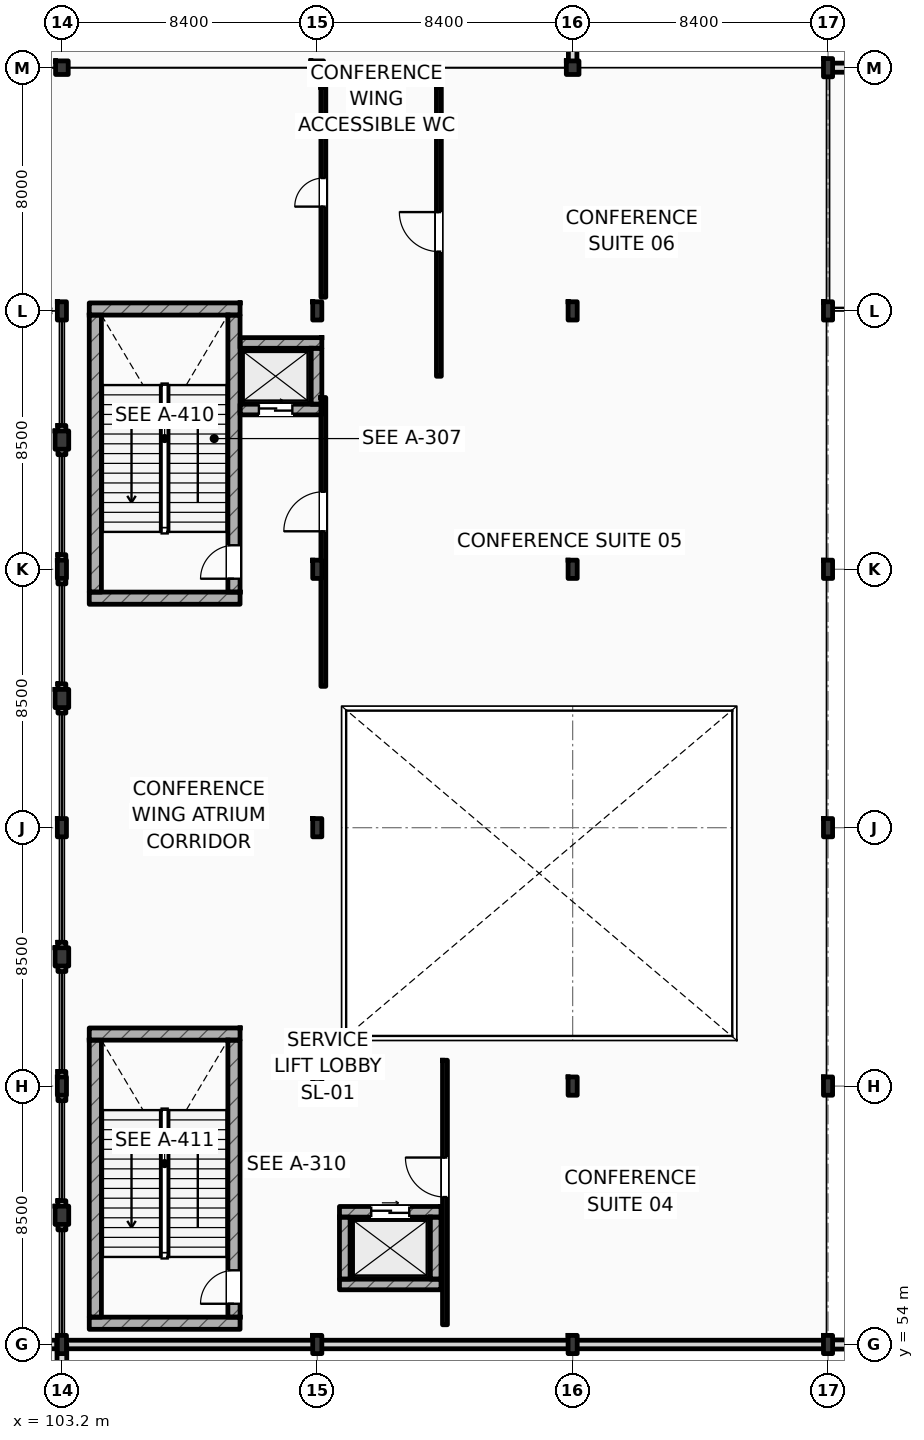
"""IFC4 building model, lengths in metres.
Left out: names, types, materials, properties, quantities, classifications, styles, units other than length and angle.
Written with IfcOpenShell. Run it as: python <this file> out.ifc"""

import sys

from ifc_helpers import new_model, si_unit, direction, frame, frame_2d, origin, origin_2d, place, context, subcontext, project, spatial, rectangle, i_section, extrude, element, fill, save


model = new_model("IFC4")
c1 = context("Model", 3, precision=1e-05, world=origin(), true_north=direction((0.0, 1.0)))
c2 = subcontext(c1, "Body", "Model", "MODEL_VIEW")
j1 = project(units=[si_unit("LENGTHUNIT", "METRE"), si_unit("PLANEANGLEUNIT", "RADIAN")], contexts=[c1])
p1 = place(None, origin())
s1 = spatial("IfcSite", under=j1, at=p1, CompositionType="ELEMENT")
p2 = place(p1, origin())
s2 = spatial("IfcBuilding", under=s1, at=p2, CompositionType="ELEMENT")
p3 = place(p2, frame((0.0, 0.0, 6.0)))
s3 = spatial("IfcBuildingStorey", under=s2, at=p3, CompositionType="ELEMENT", Elevation=6.0)
for number, where, z_axis, x_axis in (
    (1, (103.2, 96.0, 0.0), (0.0, 0.0, 1.0), (1.0, 0.0, 0.0)),
    (2, (111.6, 96.0, 0.0), (0.0, 0.0, 1.0), (1.0, 0.0, 0.0)),
    (3, (120.0, 96.0, 0.0), (0.0, 0.0, 1.0), (1.0, 0.0, 0.0)),
):
    element("IfcColumn", number, at=place(p3, frame(where, z_axis=z_axis, x_axis=x_axis)), inside=s3, PredefinedType="COLUMN", context=c2, shape_type="SweptSolid", body=[
        extrude(i_section(OverallWidth=0.416, OverallDepth=0.446, WebThickness=0.036, FlangeThickness=0.048, FilletRadius=0.015, at=origin_2d()), origin(), (0.0, 0.0, 1.0), 5.4),
    ])
for number, where, z_axis, x_axis in (
    (4, (103.2, 88.0, 0.0), (0.0, 0.0, 1.0), (1.0, 0.0, 0.0)),
    (5, (103.2, 54.0, 0.0), (0.0, 0.0, 1.0), (1.0, 0.0, 0.0)),
    (6, (103.2, 62.5, 0.0), (0.0, 0.0, 1.0), (1.0, 0.0, 0.0)),
    (7, (103.2, 71.0, 0.0), (0.0, 0.0, 1.0), (1.0, 0.0, 0.0)),
    (8, (103.2, 79.5, 0.0), (0.0, 0.0, 1.0), (1.0, 0.0, 0.0)),
    (9, (111.6, 54.0, 0.0), (0.0, 0.0, 1.0), (1.0, 0.0, 0.0)),
    (10, (111.6, 62.5, 0.0), (0.0, 0.0, 1.0), (1.0, 0.0, 0.0)),
    (11, (111.6, 71.0, 0.0), (0.0, 0.0, 1.0), (1.0, 0.0, 0.0)),
    (12, (111.6, 79.5, 0.0), (0.0, 0.0, 1.0), (1.0, 0.0, 0.0)),
    (13, (111.6, 88.0, 0.0), (0.0, 0.0, 1.0), (1.0, 0.0, 0.0)),
    (14, (120.0, 54.0, 0.0), (0.0, 0.0, 1.0), (1.0, 0.0, 0.0)),
    (15, (120.0, 62.5, 0.0), (0.0, 0.0, 1.0), (1.0, 0.0, 0.0)),
    (16, (120.0, 79.5, 0.0), (0.0, 0.0, 1.0), (1.0, 0.0, 0.0)),
    (17, (120.0, 88.0, 0.0), (0.0, 0.0, 1.0), (1.0, 0.0, 0.0)),
    (18, (128.4, 54.0, 0.0), (0.0, 0.0, 1.0), (1.0, 0.0, 0.0)),
    (19, (128.4, 62.5, 0.0), (0.0, 0.0, 1.0), (1.0, 0.0, 0.0)),
    (20, (128.4, 71.0, 0.0), (0.0, 0.0, 1.0), (1.0, 0.0, 0.0)),
    (21, (128.4, 79.5, 0.0), (0.0, 0.0, 1.0), (1.0, 0.0, 0.0)),
    (22, (128.4, 88.0, 0.0), (0.0, 0.0, 1.0), (1.0, 0.0, 0.0)),
    (23, (128.4, 96.0, 0.0), (0.0, 0.0, 1.0), (1.0, 0.0, 0.0)),
):
    element("IfcColumn", number, at=place(p3, frame(where, z_axis=z_axis, x_axis=x_axis)), inside=s3, PredefinedType="COLUMN", context=c2, shape_type="SweptSolid", body=[
        extrude(i_section(OverallWidth=0.3, OverallDepth=0.6, WebThickness=0.015, FlangeThickness=0.03, FilletRadius=0.027, at=origin_2d()), origin(), (0.0, 0.0, 1.0), 5.4),
    ])
for number, where, z_axis, x_axis in (
    (24, (103.2, 58.25, 0.0), (0.0, 0.0, 1.0), (1.0, 0.0, 0.0)),
    (25, (103.2, 66.75, 0.0), (0.0, 0.0, 1.0), (1.0, 0.0, 0.0)),
    (26, (103.2, 75.25, 0.0), (0.0, 0.0, 1.0), (1.0, 0.0, 0.0)),
    (27, (103.2, 83.75, 0.0), (0.0, 0.0, 1.0), (1.0, 0.0, 0.0)),
):
    element("IfcColumn", number, at=place(p3, frame(where, z_axis=z_axis, x_axis=x_axis)), inside=s3, PredefinedType="PILASTER", context=c2, shape_type="SweptSolid", body=[
        extrude(rectangle(XDim=0.45, YDim=0.6, at=origin_2d()), origin(), (0.0, 0.0, 1.0), 5.4),
    ])
for number, where, z_axis, x_axis in (
    (28, (104.1, 88.062, 0.0), (0.0, 0.0, 1.0), (1.0, 0.0, 0.0)),
    (29, (104.1, 78.55, 0.0), (0.0, 0.0, 1.0), (1.0, 0.0, 0.0)),
):
    element("IfcWall", number, at=place(p3, frame(where, z_axis=z_axis, x_axis=x_axis)), inside=s3, PredefinedType="SHEAR", context=c2, shape_type="SweptSolid", body=[
        extrude(rectangle(XDim=4.96, YDim=0.4, at=frame_2d((2.48, 0.0))), origin(), (0.0, 0.0, 1.0), 5.4),
    ])
p4 = place(p3, frame((104.3, 78.75, 0.0), z_axis=(0.0, 0.0, 1.0), x_axis=(0.0, 1.0, 0.0)))
e30 = element("IfcWall", 30, at=p4, inside=s3, PredefinedType="SHEAR", context=c2, shape_type="SweptSolid", body=[
    extrude(rectangle(XDim=9.112, YDim=0.4, at=frame_2d((4.556, 0.0))), origin(), (0.0, 0.0, 1.0), 5.4),
])
p5 = place(p3, frame((108.86, 78.75, 0.0), z_axis=(0.0, 0.0, 1.0), x_axis=(0.0, 1.0, 0.0)))
e31 = element("IfcWall", 31, at=p5, inside=s3, PredefinedType="SHEAR", context=c2, shape_type="SweptSolid", body=[
    extrude(rectangle(XDim=9.112, YDim=0.4, at=frame_2d((4.556, 0.0))), origin(), (0.0, 0.0, 1.0), 5.4),
])
p6 = place(p5, frame((0.44, 0.0, 0.0)))
e32 = element("IfcOpeningElement", 32, at=p6, cuts=e31, PredefinedType="OPENING", context=c2, shape_type="SweptSolid", body=[
    extrude(rectangle(XDim=1.1, YDim=2.2, at=frame_2d((0.55, 1.1))), frame((0.0, 0.21, 0.0), z_axis=(0.0, -1.0, 0.0), x_axis=(1.0, 0.0, 0.0)), (0.0, 0.0, 1.0), 0.42),
])
for number, where, z_axis, x_axis in (
    (33, (104.1, 64.212, 0.0), (0.0, 0.0, 1.0), (1.0, 0.0, 0.0)),
    (34, (104.1, 54.7, 0.0), (0.0, 0.0, 1.0), (1.0, 0.0, 0.0)),
):
    element("IfcWall", number, at=place(p3, frame(where, z_axis=z_axis, x_axis=x_axis)), inside=s3, PredefinedType="SHEAR", context=c2, shape_type="SweptSolid", body=[
        extrude(rectangle(XDim=4.96, YDim=0.4, at=frame_2d((2.48, 0.0))), origin(), (0.0, 0.0, 1.0), 5.4),
    ])
p7 = place(p3, frame((104.3, 54.9, 0.0), z_axis=(0.0, 0.0, 1.0), x_axis=(0.0, 1.0, 0.0)))
e35 = element("IfcWall", 35, at=p7, inside=s3, PredefinedType="SHEAR", context=c2, shape_type="SweptSolid", body=[
    extrude(rectangle(XDim=9.112, YDim=0.4, at=frame_2d((4.556, 0.0))), origin(), (0.0, 0.0, 1.0), 5.4),
])
p8 = place(p3, frame((108.86, 54.9, 0.0), z_axis=(0.0, 0.0, 1.0), x_axis=(0.0, 1.0, 0.0)))
e36 = element("IfcWall", 36, at=p8, inside=s3, PredefinedType="SHEAR", context=c2, shape_type="SweptSolid", body=[
    extrude(rectangle(XDim=9.112, YDim=0.4, at=frame_2d((4.556, 0.0))), origin(), (0.0, 0.0, 1.0), 5.4),
])
p9 = place(p8, frame((0.44, 0.0, 0.0)))
e37 = element("IfcOpeningElement", 37, at=p9, cuts=e36, PredefinedType="OPENING", context=c2, shape_type="SweptSolid", body=[
    extrude(rectangle(XDim=1.1, YDim=2.2, at=frame_2d((0.55, 1.1))), frame((0.0, 0.21, 0.0), z_axis=(0.0, -1.0, 0.0), x_axis=(1.0, 0.0, 0.0)), (0.0, 0.0, 1.0), 0.42),
])
p10 = place(p3, frame((103.2, 9.0, 0.0), z_axis=(0.0, 0.0, 1.0), x_axis=(0.0, 1.0, 0.0)))
e38 = element("IfcWall", 38, at=p10, inside=s3, PredefinedType="STANDARD", context=c2, shape_type="SweptSolid", body=[
    extrude(rectangle(XDim=45.0, YDim=0.32, at=frame_2d((22.5, 0.0))), origin(), (0.0, 0.0, 1.0), 4.55),
])
p11 = place(p3, frame((79.8, 54.0, 0.0), z_axis=(0.0, 0.0, 1.0), x_axis=(1.0, 0.0, 0.0)))
e39 = element("IfcWall", 39, at=p11, inside=s3, PredefinedType="STANDARD", context=c2, shape_type="SweptSolid", body=[
    extrude(rectangle(XDim=23.4, YDim=0.28, at=frame_2d((11.7, 0.0))), origin(), (0.0, 0.0, 1.0), 4.54),
])
p12 = place(p11, frame((10.65, 0.0, 1.05)))
e40 = element("IfcOpeningElement", 40, at=p12, cuts=e39, PredefinedType="OPENING", context=c2, shape_type="SweptSolid", body=[
    extrude(rectangle(XDim=2.1, YDim=2.2, at=frame_2d((1.05, 1.1))), frame((0.0, 0.15, 0.0), z_axis=(0.0, -1.0, 0.0), x_axis=(1.0, 0.0, 0.0)), (0.0, 0.0, 1.0), 0.3),
])
p13 = place(p3, frame((103.2, 54.0, 0.0), z_axis=(0.0, 0.0, 1.0), x_axis=(1.0, 0.0, 0.0)))
e41 = element("IfcWall", 41, at=p13, inside=s3, PredefinedType="STANDARD", context=c2, shape_type="SweptSolid", body=[
    extrude(rectangle(XDim=25.2, YDim=0.28, at=frame_2d((12.6, 0.0))), origin(), (0.0, 0.0, 1.0), 4.49),
])
for number, where, z_axis, x_axis in (
    (42, (103.2, 57.77, 0.0), (0.0, 0.0, 1.0), (0.0, 1.0, 0.0)),
    (43, (103.2, 62.02, 0.0), (0.0, 0.0, 1.0), (0.0, 1.0, 0.0)),
    (44, (103.2, 66.27, 0.0), (0.0, 0.0, 1.0), (0.0, 1.0, 0.0)),
    (45, (103.2, 74.77, 0.0), (0.0, 0.0, 1.0), (0.0, 1.0, 0.0)),
    (46, (103.2, 79.02, 0.0), (0.0, 0.0, 1.0), (0.0, 1.0, 0.0)),
    (47, (103.2, 83.27, 0.0), (0.0, 0.0, 1.0), (0.0, 1.0, 0.0)),
):
    element("IfcWall", number, at=place(p3, frame(where, z_axis=z_axis, x_axis=x_axis)), inside=s3, PredefinedType="STANDARD", context=c2, shape_type="SweptSolid", body=[
        extrude(rectangle(XDim=0.96, YDim=0.26, at=frame_2d((0.48, 0.0))), origin(), (0.0, 0.0, 1.0), 4.55),
    ])
p14 = place(p3, frame((128.4, 54.0, 0.0), z_axis=(0.0, 0.0, 1.0), x_axis=(1.0, 0.0, 0.0)))
e48 = element("IfcWall", 48, at=p14, inside=s3, PredefinedType="STANDARD", context=c2, shape_type="SweptSolid", body=[
    extrude(rectangle(XDim=9.0, YDim=0.3, at=frame_2d((4.5, 0.0))), origin(), (0.0, 0.0, 1.0), 4.44),
])
p15 = place(p3, frame((128.4, 96.0, 0.0), z_axis=(0.0, 0.0, 1.0), x_axis=(1.0, 0.0, 0.0)))
e49 = element("IfcWall", 49, at=p15, inside=s3, PredefinedType="STANDARD", context=c2, shape_type="SweptSolid", body=[
    extrude(rectangle(XDim=9.0, YDim=0.3, at=frame_2d((4.5, 0.0))), origin(), (0.0, 0.0, 1.0), 4.57),
])
p16 = place(p3, frame((120.0, 96.0, 0.0), z_axis=(0.0, 0.0, 1.0), x_axis=(0.0, 1.0, 0.0)))
e50 = element("IfcWall", 50, at=p16, inside=s3, PredefinedType="STANDARD", context=c2, shape_type="SweptSolid", body=[
    extrude(rectangle(XDim=22.0, YDim=0.28, at=frame_2d((11.0, 0.0))), origin(), (0.0, 0.0, 1.0), 4.59),
])
p17 = place(p3, frame((109.06, 86.945, 0.0), z_axis=(0.0, 0.0, 1.0), x_axis=(1.0, 0.0, 0.0)))
e51 = element("IfcWall", 51, at=p17, inside=s3, PredefinedType="SHEAR", context=c2, shape_type="SweptSolid", body=[
    extrude(rectangle(XDim=2.69, YDim=0.35, at=frame_2d((1.345, 0.0))), origin(), (0.0, 0.0, 1.0), 5.05),
])
p18 = place(p3, frame((109.06, 84.755, 0.0), z_axis=(0.0, 0.0, 1.0), x_axis=(1.0, 0.0, 0.0)))
e52 = element("IfcWall", 52, at=p18, inside=s3, PredefinedType="SHEAR", context=c2, shape_type="SweptSolid", body=[
    extrude(rectangle(XDim=2.69, YDim=0.35, at=frame_2d((1.345, 0.0))), origin(), (0.0, 0.0, 1.0), 5.05),
])
p19 = place(p18, frame((0.62, 0.0, 0.0)))
e53 = element("IfcOpeningElement", 53, at=p19, cuts=e52, PredefinedType="OPENING", context=c2, shape_type="SweptSolid", body=[
    extrude(rectangle(XDim=1.1, YDim=2.2, at=frame_2d((0.55, 1.1))), frame((0.0, 0.185, 0.0), z_axis=(0.0, -1.0, 0.0), x_axis=(1.0, 0.0, 0.0)), (0.0, 0.0, 1.0), 0.37),
])
p20 = place(p3, frame((111.575, 84.93, 0.0), z_axis=(0.0, 0.0, 1.0), x_axis=(0.0, 1.0, 0.0)))
e54 = element("IfcWall", 54, at=p20, inside=s3, PredefinedType="SHEAR", context=c2, shape_type="SweptSolid", body=[
    extrude(rectangle(XDim=1.84, YDim=0.35, at=frame_2d((0.92, 0.0))), origin(), (0.0, 0.0, 1.0), 4.55),
])
p21 = place(p3, frame((112.33, 58.365, 0.0), z_axis=(0.0, 0.0, 1.0), x_axis=(1.0, 0.0, 0.0)))
e55 = element("IfcWall", 55, at=p21, inside=s3, PredefinedType="SHEAR", context=c2, shape_type="SweptSolid", body=[
    extrude(rectangle(XDim=3.34, YDim=0.35, at=frame_2d((1.67, 0.0))), origin(), (0.0, 0.0, 1.0), 5.05),
])
p22 = place(p21, frame((1.045, 0.0, 0.0)))
e56 = element("IfcOpeningElement", 56, at=p22, cuts=e55, PredefinedType="OPENING", context=c2, shape_type="SweptSolid", body=[
    extrude(rectangle(XDim=1.25, YDim=2.25, at=frame_2d((0.625, 1.125))), frame((0.0, 0.185, 0.0), z_axis=(0.0, -1.0, 0.0), x_axis=(1.0, 0.0, 0.0)), (0.0, 0.0, 1.0), 0.37),
])
p23 = place(p3, frame((112.33, 55.975, 0.0), z_axis=(0.0, 0.0, 1.0), x_axis=(1.0, 0.0, 0.0)))
e57 = element("IfcWall", 57, at=p23, inside=s3, PredefinedType="SHEAR", context=c2, shape_type="SweptSolid", body=[
    extrude(rectangle(XDim=3.34, YDim=0.35, at=frame_2d((1.67, 0.0))), origin(), (0.0, 0.0, 1.0), 5.05),
])
for number, where, z_axis, x_axis in (
    (58, (112.505, 56.15, 0.0), (0.0, 0.0, 1.0), (0.0, 1.0, 0.0)),
    (59, (115.495, 56.15, 0.0), (0.0, 0.0, 1.0), (0.0, 1.0, 0.0)),
):
    element("IfcWall", number, at=place(p3, frame(where, z_axis=z_axis, x_axis=x_axis)), inside=s3, PredefinedType="SHEAR", context=c2, shape_type="SweptSolid", body=[
        extrude(rectangle(XDim=2.04, YDim=0.35, at=frame_2d((1.02, 0.0))), origin(), (0.0, 0.0, 1.0), 5.05),
    ])
p24 = place(p3, frame((115.8, 54.65, 0.0), z_axis=(0.0, 0.0, 1.0), x_axis=(0.0, 1.0, 0.0)))
e60 = element("IfcWall", 60, at=p24, inside=s3, PredefinedType="PARTITIONING", context=c2, shape_type="SweptSolid", body=[
    extrude(rectangle(XDim=8.7, YDim=0.16, at=frame_2d((4.35, 0.0))), origin(), (0.0, 0.0, 1.0), 5.05),
])
p25 = place(p24, frame((4.2, 0.0, 0.0)))
e61 = element("IfcOpeningElement", 61, at=p25, cuts=e60, PredefinedType="OPENING", context=c2, shape_type="SweptSolid", body=[
    extrude(rectangle(XDim=1.3, YDim=2.2, at=frame_2d((0.65, 1.1))), frame((0.0, 0.09, 0.0), z_axis=(0.0, -1.0, 0.0), x_axis=(1.0, 0.0, 0.0)), (0.0, 0.0, 1.0), 0.18),
])
p26 = place(p3, frame((111.8, 75.65, 0.0), z_axis=(0.0, 0.0, 1.0), x_axis=(0.0, 1.0, 0.0)))
e62 = element("IfcWall", 62, at=p26, inside=s3, PredefinedType="PARTITIONING", context=c2, shape_type="SweptSolid", body=[
    extrude(rectangle(XDim=9.5, YDim=0.16, at=frame_2d((4.75, 0.0))), origin(), (0.0, 0.0, 1.0), 4.55),
])
p27 = place(p26, frame((5.1, 0.0, 0.0)))
e63 = element("IfcOpeningElement", 63, at=p27, cuts=e62, PredefinedType="OPENING", context=c2, shape_type="SweptSolid", body=[
    extrude(rectangle(XDim=1.3, YDim=2.2, at=frame_2d((0.65, 1.1))), frame((0.0, 0.09, 0.0), z_axis=(0.0, -1.0, 0.0), x_axis=(1.0, 0.0, 0.0)), (0.0, 0.0, 1.0), 0.18),
])
p28 = place(p3, frame((115.6, 85.85, 0.0), z_axis=(0.0, 0.0, 1.0), x_axis=(0.0, 1.0, 0.0)))
e64 = element("IfcWall", 64, at=p28, inside=s3, PredefinedType="PARTITIONING", context=c2, shape_type="SweptSolid", body=[
    extrude(rectangle(XDim=9.5, YDim=0.16, at=frame_2d((4.75, 0.0))), origin(), (0.0, 0.0, 1.0), 5.05),
])
p29 = place(p28, frame((4.1, 0.0, 0.0)))
e65 = element("IfcOpeningElement", 65, at=p29, cuts=e64, PredefinedType="OPENING", context=c2, shape_type="SweptSolid", body=[
    extrude(rectangle(XDim=1.3, YDim=2.2, at=frame_2d((0.65, 1.1))), frame((0.0, 0.09, 0.0), z_axis=(0.0, -1.0, 0.0), x_axis=(1.0, 0.0, 0.0)), (0.0, 0.0, 1.0), 0.18),
])
p30 = place(p3, frame((111.8, 88.45, 0.0), z_axis=(0.0, 0.0, 1.0), x_axis=(0.0, 1.0, 0.0)))
e66 = element("IfcWall", 66, at=p30, inside=s3, PredefinedType="PARTITIONING", context=c2, shape_type="SweptSolid", body=[
    extrude(rectangle(XDim=6.9, YDim=0.16, at=frame_2d((3.45, 0.0))), origin(), (0.0, 0.0, 1.0), 4.59),
])
p31 = place(p30, frame((2.98, 0.0, 0.0)))
e67 = element("IfcOpeningElement", 67, at=p31, cuts=e66, PredefinedType="OPENING", context=c2, shape_type="SweptSolid", body=[
    extrude(rectangle(XDim=0.94, YDim=2.15, at=frame_2d((0.47, 1.075))), frame((0.0, 0.09, 0.0), z_axis=(0.0, -1.0, 0.0), x_axis=(1.0, 0.0, 0.0)), (0.0, 0.0, 1.0), 0.18),
])
p32 = place(p6, origin())
e68 = element("IfcDoor", 68, at=p32, inside=s3, OperationType="SINGLE_SWING_LEFT", PredefinedType="DOOR", context=c2, shape_type="SweptSolid", body=[
    extrude(rectangle(XDim=1.1, YDim=2.2, at=frame_2d((0.55, 1.1))), frame((0.0, 0.025, 0.0), z_axis=(0.0, -1.0, 0.0), x_axis=(1.0, 0.0, 0.0)), (0.0, 0.0, 1.0), 0.05),
])
fill(e32, e68)
p33 = place(p9, origin())
e69 = element("IfcDoor", 69, at=p33, inside=s3, OperationType="SINGLE_SWING_LEFT", PredefinedType="DOOR", context=c2, shape_type="SweptSolid", body=[
    extrude(rectangle(XDim=1.1, YDim=2.2, at=frame_2d((0.55, 1.1))), frame((0.0, 0.025, 0.0), z_axis=(0.0, -1.0, 0.0), x_axis=(1.0, 0.0, 0.0)), (0.0, 0.0, 1.0), 0.05),
])
fill(e37, e69)
p34 = place(p19, origin())
e70 = element("IfcDoor", 70, at=p34, inside=s3, OperationType="SLIDING_TO_LEFT", PredefinedType="DOOR", context=c2, shape_type="SweptSolid", body=[
    extrude(rectangle(XDim=1.1, YDim=2.2, at=frame_2d((0.55, 1.1))), frame((0.0, 0.025, 0.0), z_axis=(0.0, -1.0, 0.0), x_axis=(1.0, 0.0, 0.0)), (0.0, 0.0, 1.0), 0.05),
])
fill(e53, e70)
p35 = place(p22, origin())
e71 = element("IfcDoor", 71, at=p35, inside=s3, OperationType="SLIDING_TO_LEFT", PredefinedType="DOOR", context=c2, shape_type="SweptSolid", body=[
    extrude(rectangle(XDim=1.25, YDim=2.25, at=frame_2d((0.625, 1.125))), frame((0.0, 0.025, 0.0), z_axis=(0.0, -1.0, 0.0), x_axis=(1.0, 0.0, 0.0)), (0.0, 0.0, 1.0), 0.05),
])
fill(e56, e71)
p36 = place(p25, origin())
e72 = element("IfcDoor", 72, at=p36, inside=s3, OperationType="SINGLE_SWING_RIGHT", PredefinedType="DOOR", context=c2, shape_type="SweptSolid", body=[
    extrude(rectangle(XDim=1.3, YDim=2.2, at=frame_2d((0.65, 1.1))), frame((0.0, 0.025, 0.0), z_axis=(0.0, -1.0, 0.0), x_axis=(1.0, 0.0, 0.0)), (0.0, 0.0, 1.0), 0.05),
])
fill(e61, e72)
p37 = place(p27, origin())
e73 = element("IfcDoor", 73, at=p37, inside=s3, OperationType="SINGLE_SWING_LEFT", PredefinedType="DOOR", context=c2, shape_type="SweptSolid", body=[
    extrude(rectangle(XDim=1.3, YDim=2.2, at=frame_2d((0.65, 1.1))), frame((0.0, 0.025, 0.0), z_axis=(0.0, -1.0, 0.0), x_axis=(1.0, 0.0, 0.0)), (0.0, 0.0, 1.0), 0.05),
])
fill(e63, e73)
p38 = place(p29, origin())
e74 = element("IfcDoor", 74, at=p38, inside=s3, OperationType="SINGLE_SWING_RIGHT", PredefinedType="DOOR", context=c2, shape_type="SweptSolid", body=[
    extrude(rectangle(XDim=1.3, YDim=2.2, at=frame_2d((0.65, 1.1))), frame((0.0, 0.025, 0.0), z_axis=(0.0, -1.0, 0.0), x_axis=(1.0, 0.0, 0.0)), (0.0, 0.0, 1.0), 0.05),
])
fill(e65, e74)
p39 = place(p31, origin())
e75 = element("IfcDoor", 75, at=p39, inside=s3, OperationType="SINGLE_SWING_LEFT", PredefinedType="DOOR", context=c2, shape_type="SweptSolid", body=[
    extrude(rectangle(XDim=0.94, YDim=2.15, at=frame_2d((0.47, 1.075))), frame((0.0, 0.025, 0.0), z_axis=(0.0, -1.0, 0.0), x_axis=(1.0, 0.0, 0.0)), (0.0, 0.0, 1.0), 0.05),
])
fill(e67, e75)
save(model, sys.argv[1])
